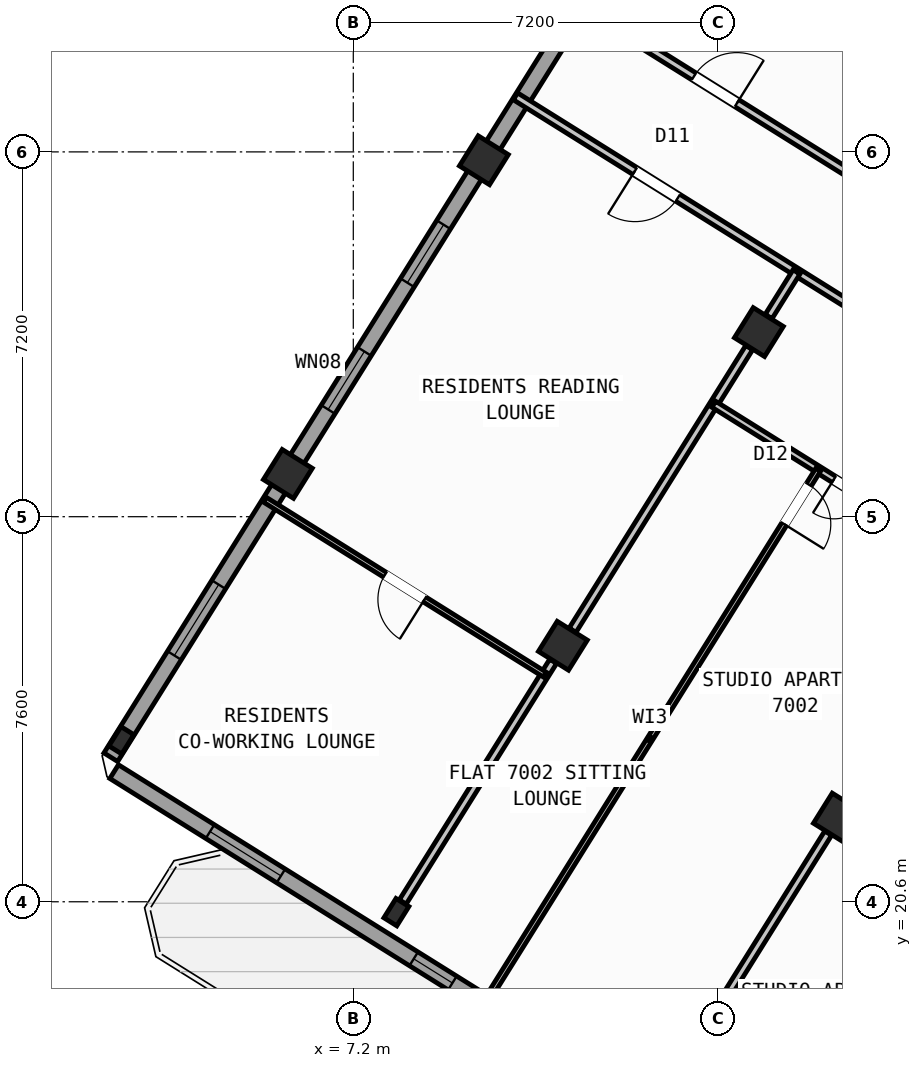
"""IFC4 building model, lengths in metres.
Left out: names, types, materials, properties, quantities, classifications, styles, units other than length and angle.
Written with IfcOpenShell. Run it as: python <this file> out.ifc"""

import sys

from ifc_helpers import new_model, si_unit, direction, frame, frame_2d, origin, origin_2d, place, context, subcontext, project, spatial, rectangle, hollow_rectangle, i_section, extrude, source, transform, mapped, element, fill, save


model = new_model("IFC4")
c1 = context("Model", 3, precision=1e-05, world=origin(), true_north=direction((0.0, 1.0)))
c2 = subcontext(c1, "Body", "Model", "MODEL_VIEW")
j1 = project(units=[si_unit("LENGTHUNIT", "METRE"), si_unit("PLANEANGLEUNIT", "RADIAN")], contexts=[c1])
p1 = place(None, origin())
s1 = spatial("IfcSite", under=j1, at=p1, CompositionType="ELEMENT")
p2 = place(p1, origin())
s2 = spatial("IfcBuilding", under=s1, at=p2, CompositionType="ELEMENT")
p3 = place(p2, frame((0.0, 0.0, 277.2)))
s3 = spatial("IfcBuildingStorey", under=s2, at=p3, CompositionType="ELEMENT", Elevation=277.2)
m1 = source(origin(), c2, "Body", "SweptSolid", [
    extrude(hollow_rectangle(XDim=0.7, YDim=0.7, WallThickness=0.028, at=origin_2d()), origin(), (0.0, 0.0, 1.0), 3.6),
])
for number, where, z_axis, x_axis in (
    (1, (16.764, 22.261, 0.0), (0.0, 0.0, 1.0), (-0.848, 0.53, 0.0)),
    (2, (15.205, 31.844, 0.0), (0.0, 0.0, 1.0), (-0.848, 0.53, 0.0)),
    (3, (11.336, 25.653, 0.0), (0.0, 0.0, 1.0), (-0.848, 0.53, 0.0)),
):
    element("IfcColumn", number, at=place(p3, frame(where, z_axis=z_axis, x_axis=x_axis)), inside=s3, PredefinedType="COLUMN", context=c2, shape_type="MappedRepresentation", body=[
        mapped(m1, transform((0.0, 0.0, 0.0), scale=1.0)),
    ])
m2 = source(origin(), c2, "Body", "SweptSolid", [
    extrude(i_section(OverallWidth=0.3, OverallDepth=0.45, WebThickness=0.014, FlangeThickness=0.026, at=origin_2d()), origin(), (0.0, 0.0, 1.0), 3.6),
])
p4 = place(p3, frame((8.051, 20.395, 0.0), z_axis=(0.0, 0.0, 1.0), x_axis=(-0.848048096156, 0.529919264233, 0.0)))
e4 = element("IfcColumn", 4, at=p4, inside=s3, PredefinedType="COLUMN", context=c2, shape_type="MappedRepresentation", body=[
    mapped(m2, transform((0.0, 0.0, 0.0), scale=1.0)),
])
for number, where, z_axis, x_axis in (
    (5, (9.777, 35.235, 0.0), (0.0, 0.0, 1.0), (-0.848, 0.53, 0.0)),
    (6, (5.909, 29.044, 0.0), (0.0, 0.0, 1.0), (-0.848, 0.53, 0.0)),
):
    element("IfcColumn", number, at=place(p3, frame(where, z_axis=z_axis, x_axis=x_axis)), inside=s3, PredefinedType="COLUMN", context=c2, shape_type="MappedRepresentation", body=[
        mapped(m1, transform((0.0, 0.0, 0.0), scale=1.0)),
    ])
p5 = place(p3, frame((2.623, 23.786, 0.0), z_axis=(0.0, 0.0, 1.0), x_axis=(-0.848048096156, 0.529919264233, 0.0)))
e7 = element("IfcColumn", 7, at=p5, inside=s3, PredefinedType="COLUMN", context=c2, shape_type="MappedRepresentation", body=[
    mapped(m2, transform((0.0, 0.0, 0.0), scale=1.0)),
])
p6 = place(p3, frame((29.268, 6.429, 0.0), z_axis=(0.0, 0.0, 1.0), x_axis=(-0.848049971435, 0.529916263149, 0.0)))
e8 = element("IfcWall", 8, at=p6, inside=s3, PredefinedType="STANDARD", context=c2, shape_type="SweptSolid", body=[
    extrude(rectangle(XDim=31.588, YDim=0.32, at=frame_2d((15.794, 0.0))), origin(), (0.0, 0.0, 1.0), 3.35),
])
p7 = place(p6, frame((16.362, 0.0, 0.0)))
e9 = element("IfcOpeningElement", 9, at=p7, cuts=e8, PredefinedType="OPENING", context=c2, shape_type="SweptSolid", body=[
    extrude(rectangle(XDim=1.2, YDim=2.15, at=frame_2d((0.6, 1.075))), frame((0.0, 0.17, 0.0), z_axis=(0.0, -1.0, 0.0), x_axis=(1.0, 0.0, 0.0)), (0.0, 0.0, 1.0), 0.34),
])
p8 = place(p6, frame((3.859, 0.0, 0.9)))
e10 = element("IfcOpeningElement", 10, at=p8, cuts=e8, PredefinedType="OPENING", context=c2, shape_type="SweptSolid", body=[
    extrude(rectangle(XDim=1.65, YDim=1.45, at=frame_2d((0.825, 0.725))), frame((0.0, 0.17, 0.0), z_axis=(0.0, -1.0, 0.0), x_axis=(1.0, 0.0, 0.0)), (0.0, 0.0, 1.0), 0.34),
])
p9 = place(p6, frame((10.519, 0.0, 0.9)))
e11 = element("IfcOpeningElement", 11, at=p9, cuts=e8, PredefinedType="OPENING", context=c2, shape_type="SweptSolid", body=[
    extrude(rectangle(XDim=1.65, YDim=1.45, at=frame_2d((0.825, 0.725))), frame((0.0, 0.17, 0.0), z_axis=(0.0, -1.0, 0.0), x_axis=(1.0, 0.0, 0.0)), (0.0, 0.0, 1.0), 0.34),
])
p10 = place(p6, frame((20.015, 0.0, 0.95)))
e12 = element("IfcOpeningElement", 12, at=p10, cuts=e8, PredefinedType="OPENING", context=c2, shape_type="SweptSolid", body=[
    extrude(rectangle(XDim=1.95, YDim=1.35, at=frame_2d((0.975, 0.675))), frame((0.0, 0.17, 0.0), z_axis=(0.0, -1.0, 0.0), x_axis=(1.0, 0.0, 0.0)), (0.0, 0.0, 1.0), 0.34),
])
p11 = place(p6, frame((23.715, 0.0, 1.0)))
e13 = element("IfcOpeningElement", 13, at=p11, cuts=e8, PredefinedType="OPENING", context=c2, shape_type="SweptSolid", body=[
    extrude(rectangle(XDim=0.9, YDim=1.25, at=frame_2d((0.45, 0.625))), frame((0.0, 0.17, 0.0), z_axis=(0.0, -1.0, 0.0), x_axis=(1.0, 0.0, 0.0)), (0.0, 0.0, 1.0), 0.34),
])
p12 = place(p6, frame((27.706, 0.0, 0.9)))
e14 = element("IfcOpeningElement", 14, at=p12, cuts=e8, PredefinedType="OPENING", context=c2, shape_type="SweptSolid", body=[
    extrude(rectangle(XDim=1.65, YDim=1.45, at=frame_2d((0.825, 0.725))), frame((0.0, 0.17, 0.0), z_axis=(0.0, -1.0, 0.0), x_axis=(1.0, 0.0, 0.0)), (0.0, 0.0, 1.0), 0.34),
])
p13 = place(p3, frame((2.415, 23.452, 0.0), z_axis=(0.0, 0.0, 1.0), x_axis=(0.52991049553, 0.848053575387, 0.0)))
e15 = element("IfcWall", 15, at=p13, inside=s3, PredefinedType="STANDARD", context=c2, shape_type="SweptSolid", body=[
    extrude(rectangle(XDim=21.587, YDim=0.32, at=frame_2d((10.794, 0.0))), origin(), (0.0, 0.0, 1.0), 3.35),
])
p14 = place(p13, frame((2.368, 0.0, 0.9)))
e16 = element("IfcOpeningElement", 16, at=p14, cuts=e15, PredefinedType="OPENING", context=c2, shape_type="SweptSolid", body=[
    extrude(rectangle(XDim=1.65, YDim=1.45, at=frame_2d((0.825, 0.725))), frame((0.0, 0.17, 0.0), z_axis=(0.0, -1.0, 0.0), x_axis=(1.0, 0.0, 0.0)), (0.0, 0.0, 1.0), 0.34),
])
p15 = place(p13, frame((8.094, 0.0, 0.9)))
e17 = element("IfcOpeningElement", 17, at=p15, cuts=e15, PredefinedType="OPENING", context=c2, shape_type="SweptSolid", body=[
    extrude(rectangle(XDim=1.35, YDim=1.45, at=frame_2d((0.675, 0.725))), frame((0.0, 0.17, 0.0), z_axis=(0.0, -1.0, 0.0), x_axis=(1.0, 0.0, 0.0)), (0.0, 0.0, 1.0), 0.34),
])
p16 = place(p13, frame((11.044, 0.0, 0.9)))
e18 = element("IfcOpeningElement", 18, at=p16, cuts=e15, PredefinedType="OPENING", context=c2, shape_type="SweptSolid", body=[
    extrude(rectangle(XDim=1.35, YDim=1.45, at=frame_2d((0.675, 0.725))), frame((0.0, 0.17, 0.0), z_axis=(0.0, -1.0, 0.0), x_axis=(1.0, 0.0, 0.0)), (0.0, 0.0, 1.0), 0.34),
])
p17 = place(p13, frame((18.809, 0.0, 1.0)))
e19 = element("IfcOpeningElement", 19, at=p17, cuts=e15, PredefinedType="OPENING", context=c2, shape_type="SweptSolid", body=[
    extrude(rectangle(XDim=0.9, YDim=1.25, at=frame_2d((0.45, 0.625))), frame((0.0, 0.17, 0.0), z_axis=(0.0, -1.0, 0.0), x_axis=(1.0, 0.0, 0.0)), (0.0, 0.0, 1.0), 0.34),
])
p18 = place(p3, frame((14.138, 41.825, 0.0), z_axis=(0.0, 0.0, 1.0), x_axis=(0.848046498049, -0.529921821731, 0.0)))
e20 = element("IfcWall", 20, at=p18, inside=s3, PredefinedType="STANDARD", context=c2, shape_type="SweptSolid", body=[
    extrude(rectangle(XDim=31.588, YDim=0.32, at=frame_2d((15.794, 0.0))), origin(), (0.0, 0.0, 1.0), 3.35),
])
p19 = place(p18, frame((3.568, 0.0, 0.0)))
e21 = element("IfcOpeningElement", 21, at=p19, cuts=e20, PredefinedType="OPENING", context=c2, shape_type="SweptSolid", body=[
    extrude(rectangle(XDim=1.05, YDim=2.15, at=frame_2d((0.525, 1.075))), frame((0.0, 0.17, 0.0), z_axis=(0.0, -1.0, 0.0), x_axis=(1.0, 0.0, 0.0)), (0.0, 0.0, 1.0), 0.34),
])
p20 = place(p18, frame((1.046, 0.0, 0.9)))
e22 = element("IfcOpeningElement", 22, at=p20, cuts=e20, PredefinedType="OPENING", context=c2, shape_type="SweptSolid", body=[
    extrude(rectangle(XDim=1.65, YDim=1.45, at=frame_2d((0.825, 0.725))), frame((0.0, 0.17, 0.0), z_axis=(0.0, -1.0, 0.0), x_axis=(1.0, 0.0, 0.0)), (0.0, 0.0, 1.0), 0.34),
])
p21 = place(p18, frame((8.61, 0.0, 0.9)))
e23 = element("IfcOpeningElement", 23, at=p21, cuts=e20, PredefinedType="OPENING", context=c2, shape_type="SweptSolid", body=[
    extrude(rectangle(XDim=1.35, YDim=1.45, at=frame_2d((0.675, 0.725))), frame((0.0, 0.17, 0.0), z_axis=(0.0, -1.0, 0.0), x_axis=(1.0, 0.0, 0.0)), (0.0, 0.0, 1.0), 0.34),
])
p22 = place(p18, frame((13.599, 0.0, 0.95)))
e24 = element("IfcOpeningElement", 24, at=p22, cuts=e20, PredefinedType="OPENING", context=c2, shape_type="SweptSolid", body=[
    extrude(rectangle(XDim=1.95, YDim=1.35, at=frame_2d((0.975, 0.675))), frame((0.0, 0.17, 0.0), z_axis=(0.0, -1.0, 0.0), x_axis=(1.0, 0.0, 0.0)), (0.0, 0.0, 1.0), 0.34),
])
p23 = place(p18, frame((17.154, 0.0, 1.0)))
e25 = element("IfcOpeningElement", 25, at=p23, cuts=e20, PredefinedType="OPENING", context=c2, shape_type="SweptSolid", body=[
    extrude(rectangle(XDim=0.9, YDim=1.25, at=frame_2d((0.45, 0.625))), frame((0.0, 0.17, 0.0), z_axis=(0.0, -1.0, 0.0), x_axis=(1.0, 0.0, 0.0)), (0.0, 0.0, 1.0), 0.34),
])
p24 = place(p18, frame((21.719, 0.0, 0.9)))
e26 = element("IfcOpeningElement", 26, at=p24, cuts=e20, PredefinedType="OPENING", context=c2, shape_type="SweptSolid", body=[
    extrude(rectangle(XDim=1.65, YDim=1.45, at=frame_2d((0.825, 0.725))), frame((0.0, 0.17, 0.0), z_axis=(0.0, -1.0, 0.0), x_axis=(1.0, 0.0, 0.0)), (0.0, 0.0, 1.0), 0.34),
])
p25 = place(p18, frame((27.419, 0.0, 0.9)))
e27 = element("IfcOpeningElement", 27, at=p25, cuts=e20, PredefinedType="OPENING", context=c2, shape_type="SweptSolid", body=[
    extrude(rectangle(XDim=1.65, YDim=1.45, at=frame_2d((0.825, 0.725))), frame((0.0, 0.17, 0.0), z_axis=(0.0, -1.0, 0.0), x_axis=(1.0, 0.0, 0.0)), (0.0, 0.0, 1.0), 0.34),
])
p26 = place(p3, frame((24.588, 27.631, 0.0), z_axis=(0.0, 0.0, 1.0), x_axis=(-0.529914586043, -0.848051019396, 0.0)))
e28 = element("IfcWall", 28, at=p26, inside=s3, PredefinedType="PARTITIONING", context=c2, shape_type="SweptSolid", body=[
    extrude(rectangle(XDim=15.35, YDim=0.16, at=frame_2d((7.675, 0.0))), origin(), (0.0, 0.0, 1.0), 3.34),
])
p27 = place(p3, frame((25.754, 29.497, 0.0), z_axis=(0.0, 0.0, 1.0), x_axis=(-0.848045850158, 0.529922858565, 0.0)))
e29 = element("IfcWall", 29, at=p27, inside=s3, PredefinedType="PARTITIONING", context=c2, shape_type="SweptSolid", body=[
    extrude(rectangle(XDim=16.73, YDim=0.16, at=frame_2d((8.365, 0.0))), origin(), (0.0, 0.0, 1.0), 3.34),
])
p28 = place(p27, frame((1.588, 0.0, 0.0)))
e30 = element("IfcOpeningElement", 30, at=p28, cuts=e29, PredefinedType="OPENING", context=c2, shape_type="SweptSolid", body=[
    extrude(rectangle(XDim=1.0, YDim=2.1, at=frame_2d((0.5, 1.05))), frame((0.0, 0.09, 0.0), z_axis=(0.0, -1.0, 0.0), x_axis=(1.0, 0.0, 0.0)), (0.0, 0.0, 1.0), 0.18),
])
p29 = place(p27, frame((6.685, 0.0, 0.0)))
e31 = element("IfcOpeningElement", 31, at=p29, cuts=e29, PredefinedType="OPENING", context=c2, shape_type="SweptSolid", body=[
    extrude(rectangle(XDim=1.0, YDim=2.1, at=frame_2d((0.5, 1.05))), frame((0.0, 0.09, 0.0), z_axis=(0.0, -1.0, 0.0), x_axis=(1.0, 0.0, 0.0)), (0.0, 0.0, 1.0), 0.18),
])
p30 = place(p27, frame((12.951, 0.0, 0.0)))
e32 = element("IfcOpeningElement", 32, at=p30, cuts=e29, PredefinedType="OPENING", context=c2, shape_type="SweptSolid", body=[
    extrude(rectangle(XDim=1.0, YDim=2.1, at=frame_2d((0.5, 1.05))), frame((0.0, 0.09, 0.0), z_axis=(0.0, -1.0, 0.0), x_axis=(1.0, 0.0, 0.0)), (0.0, 0.0, 1.0), 0.18),
])
p31 = place(p3, frame((24.588, 27.631, 0.0), z_axis=(0.0, 0.0, 1.0), x_axis=(-0.848041752158, 0.529929416617, 0.0)))
e33 = element("IfcWall", 33, at=p31, inside=s3, PredefinedType="PARTITIONING", context=c2, shape_type="SweptSolid", body=[
    extrude(rectangle(XDim=16.73, YDim=0.16, at=frame_2d((8.365, 0.0))), origin(), (0.0, 0.0, 1.0), 3.34),
])
p32 = place(p31, frame((2.22, 0.0, 0.0)))
e34 = element("IfcOpeningElement", 34, at=p32, cuts=e33, PredefinedType="OPENING", context=c2, shape_type="SweptSolid", body=[
    extrude(rectangle(XDim=0.86, YDim=2.05, at=frame_2d((0.43, 1.025))), frame((0.0, 0.09, 0.0), z_axis=(0.0, -1.0, 0.0), x_axis=(1.0, 0.0, 0.0)), (0.0, 0.0, 1.0), 0.18),
])
p33 = place(p31, frame((7.82, 0.0, 0.0)))
e35 = element("IfcOpeningElement", 35, at=p33, cuts=e33, PredefinedType="OPENING", context=c2, shape_type="SweptSolid", body=[
    extrude(rectangle(XDim=1.0, YDim=2.1, at=frame_2d((0.5, 1.05))), frame((0.0, 0.09, 0.0), z_axis=(0.0, -1.0, 0.0), x_axis=(1.0, 0.0, 0.0)), (0.0, 0.0, 1.0), 0.18),
])
p34 = place(p31, frame((12.95, 0.0, 0.0)))
e36 = element("IfcOpeningElement", 36, at=p34, cuts=e33, PredefinedType="OPENING", context=c2, shape_type="SweptSolid", body=[
    extrude(rectangle(XDim=1.0, YDim=2.1, at=frame_2d((0.5, 1.05))), frame((0.0, 0.09, 0.0), z_axis=(0.0, -1.0, 0.0), x_axis=(1.0, 0.0, 0.0)), (0.0, 0.0, 1.0), 0.18),
])
p35 = place(p3, frame((16.572, 21.954, 0.0), z_axis=(0.0, 0.0, 1.0), x_axis=(-0.529904903214, -0.848057069748, 0.0)))
e37 = element("IfcWall", 37, at=p35, inside=s3, PredefinedType="PARTITIONING", context=c2, shape_type="SweptSolid", body=[
    extrude(rectangle(XDim=5.601, YDim=0.16, at=frame_2d((2.801, 0.0))), origin(), (0.0, 0.0, 1.0), 2.875),
])
p36 = place(p3, frame((15.946, 33.031, 0.0), z_axis=(0.0, 0.0, 1.0), x_axis=(-0.529977795385, -0.848011519025, 0.0)))
e38 = element("IfcWall", 38, at=p36, inside=s3, PredefinedType="PARTITIONING", context=c2, shape_type="SweptSolid", body=[
    extrude(rectangle(XDim=1.038, YDim=0.16, at=frame_2d((0.519, 0.0))), origin(), (0.0, 0.0, 1.0), 2.875),
])
p37 = place(p3, frame((15.013, 31.537, 0.0), z_axis=(0.0, 0.0, 1.0), x_axis=(-0.529922185033, -0.848046271031, 0.0)))
e39 = element("IfcWall", 39, at=p37, inside=s3, PredefinedType="PARTITIONING", context=c2, shape_type="SweptSolid", body=[
    extrude(rectangle(XDim=6.576, YDim=0.16, at=frame_2d((3.288, 0.0))), origin(), (0.0, 0.0, 1.0), 2.875),
])
p38 = place(p3, frame((11.144, 25.346, 0.0), z_axis=(0.0, 0.0, 1.0), x_axis=(-0.529904903214, -0.848057069748, 0.0)))
e40 = element("IfcWall", 40, at=p38, inside=s3, PredefinedType="PARTITIONING", context=c2, shape_type="SweptSolid", body=[
    extrude(rectangle(XDim=5.601, YDim=0.16, at=frame_2d((2.801, 0.0))), origin(), (0.0, 0.0, 1.0), 2.875),
])
p39 = place(p3, frame((19.742, 27.027, 0.0), z_axis=(0.0, 0.0, 1.0), x_axis=(-0.848039019877, 0.529933789039, 0.0)))
e41 = element("IfcWall", 41, at=p39, inside=s3, PredefinedType="PLUMBINGWALL", context=c2, shape_type="SweptSolid", body=[
    extrude(rectangle(XDim=6.4, YDim=0.14, at=frame_2d((3.2, 0.0))), origin(), (0.0, 0.0, 1.0), 3.34),
])
p40 = place(p39, frame((2.824, 0.0, 0.0)))
e42 = element("IfcOpeningElement", 42, at=p40, cuts=e41, PredefinedType="OPENING", context=c2, shape_type="SweptSolid", body=[
    extrude(rectangle(XDim=0.78, YDim=2.05, at=frame_2d((0.39, 1.025))), frame((0.0, 0.08, 0.0), z_axis=(0.0, -1.0, 0.0), x_axis=(1.0, 0.0, 0.0)), (0.0, 0.0, 1.0), 0.16),
])
p41 = place(p3, frame((16.377, 29.13, 0.0), z_axis=(0.0, 0.0, 1.0), x_axis=(-0.529923687379, -0.848045332252, 0.0)))
e43 = element("IfcWall", 43, at=p41, inside=s3, PredefinedType="PARTITIONING", context=c2, shape_type="SweptSolid", body=[
    extrude(rectangle(XDim=12.54, YDim=0.11, at=frame_2d((6.27, 0.0))), origin(), (0.0, 0.0, 1.0), 3.34),
])
p42 = place(p41, frame((0.35, 0.0, 0.0)))
e44 = element("IfcOpeningElement", 44, at=p42, cuts=e43, PredefinedType="OPENING", context=c2, shape_type="SweptSolid", body=[
    extrude(rectangle(XDim=0.92, YDim=2.08, at=frame_2d((0.46, 1.04))), frame((0.0, 0.065, 0.0), z_axis=(0.0, -1.0, 0.0), x_axis=(1.0, 0.0, 0.0)), (0.0, 0.0, 1.0), 0.13),
])
p43 = place(p3, frame((10.98, 25.083, 0.0), z_axis=(0.0, 0.0, 1.0), x_axis=(-0.848048787466, 0.529918157905, 0.0)))
e45 = element("IfcWall", 45, at=p43, inside=s3, PredefinedType="PARTITIONING", context=c2, shape_type="SweptSolid", body=[
    extrude(rectangle(XDim=6.52, YDim=0.11, at=frame_2d((3.26, 0.0))), origin(), (0.0, 0.0, 1.0), 3.34),
])
p44 = place(p43, frame((2.8, 0.0, 0.0)))
e46 = element("IfcOpeningElement", 46, at=p44, cuts=e45, PredefinedType="OPENING", context=c2, shape_type="SweptSolid", body=[
    extrude(rectangle(XDim=0.92, YDim=2.08, at=frame_2d((0.46, 1.04))), frame((0.0, 0.065, 0.0), z_axis=(0.0, -1.0, 0.0), x_axis=(1.0, 0.0, 0.0)), (0.0, 0.0, 1.0), 0.13),
])
m3 = source(origin(), c2, "Body", "SweptSolid", [
    extrude(rectangle(XDim=0.9, YDim=1.25, at=frame_2d((0.45, 0.625))), frame((0.0, 0.03, 0.0), z_axis=(0.0, -1.0, 0.0), x_axis=(1.0, 0.0, 0.0)), (0.0, 0.0, 1.0), 0.06),
])
p45 = place(p11, origin())
e47 = element("IfcWindow", 47, at=p45, inside=s3, PartitioningType="SINGLE_PANEL", PredefinedType="WINDOW", context=c2, shape_type="MappedRepresentation", body=[
    mapped(m3, transform((0.0, 0.0, 0.0), scale=1.0)),
])
fill(e13, e47)
m4 = source(origin(), c2, "Body", "SweptSolid", [
    extrude(rectangle(XDim=1.65, YDim=1.45, at=frame_2d((0.825, 0.725))), frame((0.0, 0.03, 0.0), z_axis=(0.0, -1.0, 0.0), x_axis=(1.0, 0.0, 0.0)), (0.0, 0.0, 1.0), 0.06),
])
p46 = place(p12, origin())
e48 = element("IfcWindow", 48, at=p46, inside=s3, PartitioningType="SINGLE_PANEL", PredefinedType="WINDOW", context=c2, shape_type="MappedRepresentation", body=[
    mapped(m4, transform((0.0, 0.0, 0.0), scale=1.0)),
])
fill(e14, e48)
p47 = place(p14, origin())
e49 = element("IfcWindow", 49, at=p47, inside=s3, PartitioningType="SINGLE_PANEL", PredefinedType="WINDOW", context=c2, shape_type="MappedRepresentation", body=[
    mapped(m4, transform((0.0, 0.0, 0.0), scale=1.0)),
])
fill(e16, e49)
m5 = source(origin(), c2, "Body", "SweptSolid", [
    extrude(rectangle(XDim=1.35, YDim=1.45, at=frame_2d((0.675, 0.725))), frame((0.0, 0.03, 0.0), z_axis=(0.0, -1.0, 0.0), x_axis=(1.0, 0.0, 0.0)), (0.0, 0.0, 1.0), 0.06),
])
p48 = place(p15, origin())
e50 = element("IfcWindow", 50, at=p48, inside=s3, PartitioningType="SINGLE_PANEL", PredefinedType="WINDOW", context=c2, shape_type="MappedRepresentation", body=[
    mapped(m5, transform((0.0, 0.0, 0.0), scale=1.0)),
])
fill(e17, e50)
p49 = place(p16, origin())
e51 = element("IfcWindow", 51, at=p49, inside=s3, PartitioningType="SINGLE_PANEL", PredefinedType="WINDOW", context=c2, shape_type="MappedRepresentation", body=[
    mapped(m5, transform((0.0, 0.0, 0.0), scale=1.0)),
])
fill(e18, e51)
m6 = source(origin(), c2, "Body", "SweptSolid", [
    extrude(rectangle(XDim=0.92, YDim=2.08, at=frame_2d((0.46, 1.04))), frame((0.0, 0.025, 0.0), z_axis=(0.0, -1.0, 0.0), x_axis=(1.0, 0.0, 0.0)), (0.0, 0.0, 1.0), 0.05),
])
p50 = place(p42, origin())
e52 = element("IfcDoor", 52, at=p50, inside=s3, OperationType="SINGLE_SWING_RIGHT", PredefinedType="DOOR", context=c2, shape_type="MappedRepresentation", body=[
    mapped(m6, transform((0.0, 0.0, 0.0), scale=1.0)),
])
fill(e44, e52)
m7 = source(origin(), c2, "Body", "SweptSolid", [
    extrude(rectangle(XDim=0.78, YDim=2.05, at=frame_2d((0.39, 1.025))), frame((0.0, 0.025, 0.0), z_axis=(0.0, -1.0, 0.0), x_axis=(1.0, 0.0, 0.0)), (0.0, 0.0, 1.0), 0.05),
])
p51 = place(p40, origin())
e53 = element("IfcDoor", 53, at=p51, inside=s3, OperationType="SINGLE_SWING_RIGHT", PredefinedType="DOOR", context=c2, shape_type="MappedRepresentation", body=[
    mapped(m7, transform((0.0, 0.0, 0.0), scale=1.0)),
])
fill(e42, e53)
m8 = source(origin(), c2, "Body", "SweptSolid", [
    extrude(rectangle(XDim=1.0, YDim=2.1, at=frame_2d((0.5, 1.05))), frame((0.0, 0.025, 0.0), z_axis=(0.0, -1.0, 0.0), x_axis=(1.0, 0.0, 0.0)), (0.0, 0.0, 1.0), 0.05),
])
p52 = place(p34, origin())
e54 = element("IfcDoor", 54, at=p52, inside=s3, OperationType="SINGLE_SWING_RIGHT", PredefinedType="DOOR", context=c2, shape_type="MappedRepresentation", body=[
    mapped(m8, transform((0.0, 0.0, 0.0), scale=1.0)),
])
fill(e36, e54)
p53 = place(p44, origin())
e55 = element("IfcDoor", 55, at=p53, inside=s3, OperationType="SINGLE_SWING_LEFT", PredefinedType="DOOR", context=c2, shape_type="MappedRepresentation", body=[
    mapped(m6, transform((0.0, 0.0, 0.0), scale=1.0)),
])
fill(e46, e55)
p54 = place(p30, frame((1.0, 0.0, 0.0), z_axis=(0.0, 0.0, 1.0), x_axis=(-1.0, 0.0, 0.0)))
e56 = element("IfcDoor", 56, at=p54, inside=s3, OperationType="SINGLE_SWING_RIGHT", PredefinedType="DOOR", context=c2, shape_type="MappedRepresentation", body=[
    mapped(m8, transform((0.0, 0.0, 0.0), scale=1.0)),
])
fill(e32, e56)
save(model, sys.argv[1])
